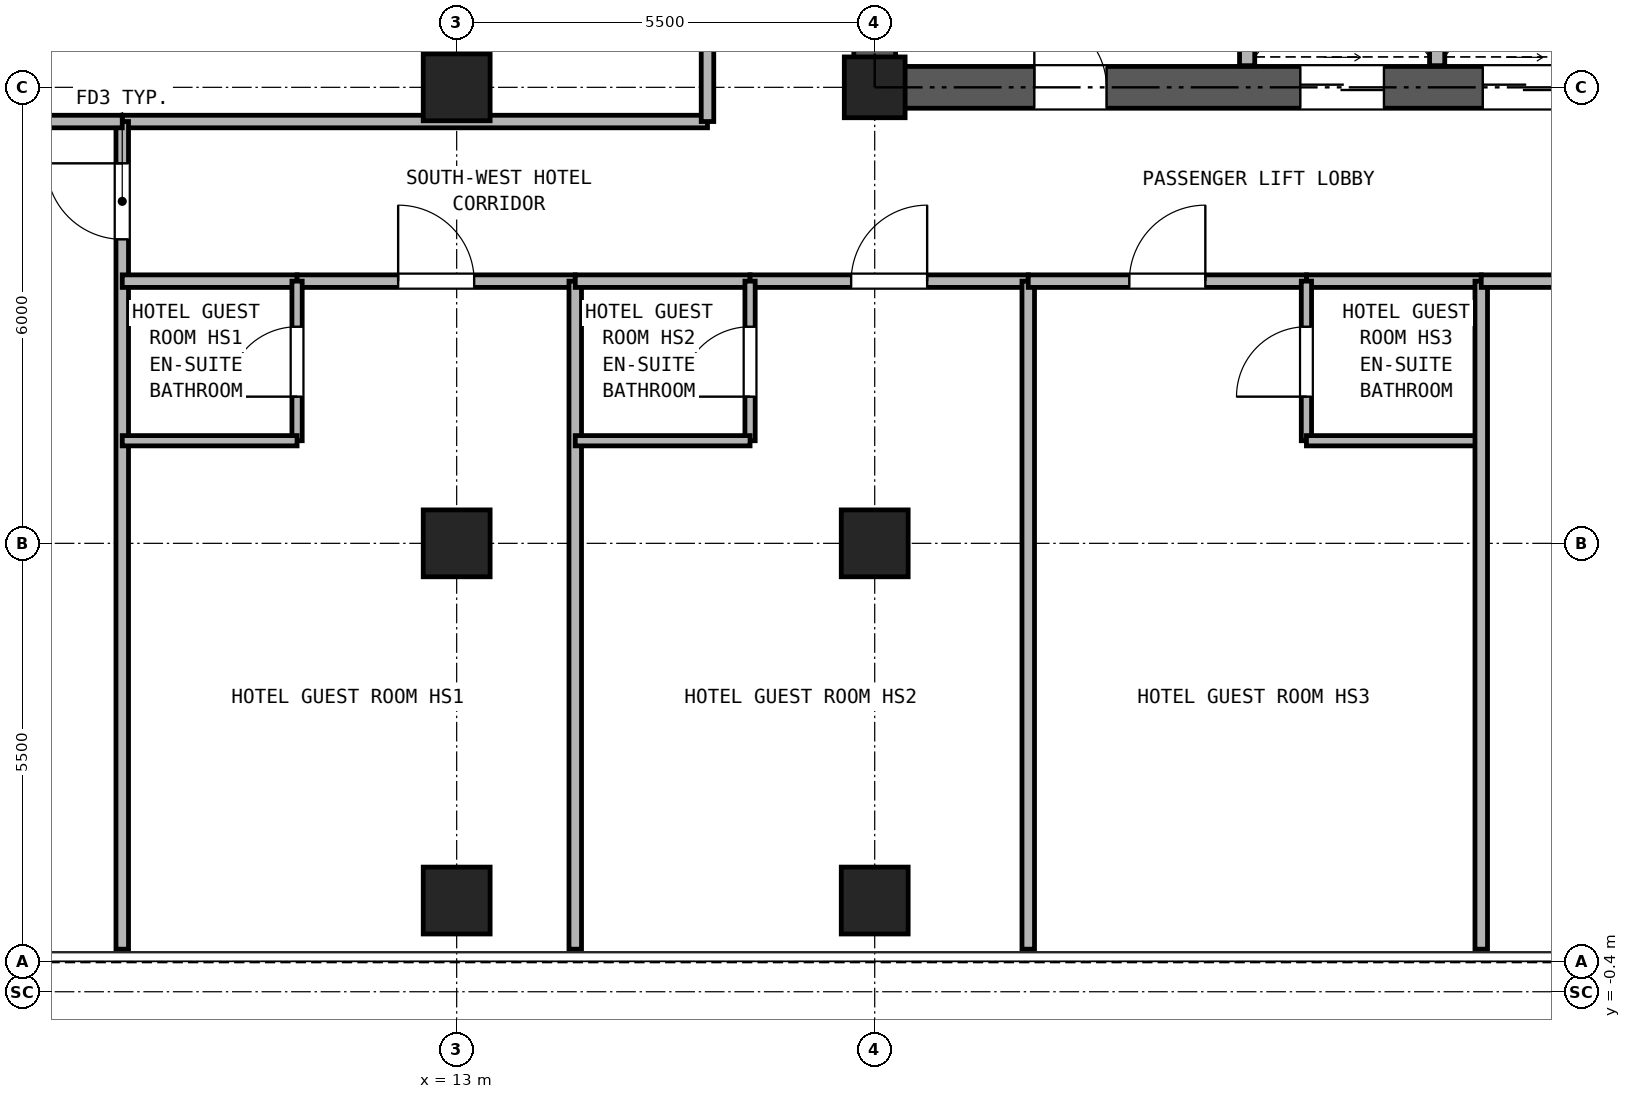
"""IFC4 building model, lengths in metres.
Left out: names, types, materials, properties, quantities, classifications, styles, units other than length and angle.
Written with IfcOpenShell. Run it as: python <this file> out.ifc"""

import sys

from ifc_helpers import new_model, si_unit, direction, frame, frame_2d, origin, origin_2d, place, context, subcontext, project, spatial, rectangle, hollow_rectangle, extrude, source, transform, mapped, element, fill, save


model = new_model("IFC4")
c1 = context("Model", 3, precision=1e-05, world=origin(), true_north=direction((0.0, 1.0)))
c2 = subcontext(c1, "Body", "Model", "MODEL_VIEW")
j1 = project(units=[si_unit("LENGTHUNIT", "METRE"), si_unit("PLANEANGLEUNIT", "RADIAN")], contexts=[c1])
p1 = place(None, origin())
s1 = spatial("IfcSite", under=j1, at=p1, CompositionType="ELEMENT")
p2 = place(p1, origin())
s2 = spatial("IfcBuilding", under=s1, at=p2, CompositionType="ELEMENT")
p3 = place(p2, frame((0.0, 0.0, 115.1)))
s3 = spatial("IfcBuildingStorey", under=s2, at=p3, CompositionType="ELEMENT", Elevation=115.1)
m1 = source(origin(), c2, "Body", "SweptSolid", [
    extrude(hollow_rectangle(XDim=0.88, YDim=0.88, WallThickness=0.05, at=origin_2d()), origin(), (0.0, 0.0, 1.0), 2.95),
])
for number, where, z_axis, x_axis in (
    (1, (13.0, 0.8, 0.0), (0.0, 0.0, 1.0), (1.0, 0.0, 0.0)),
    (2, (18.5, 0.8, 0.0), (0.0, 0.0, 1.0), (1.0, 0.0, 0.0)),
    (3, (13.0, 5.5, 0.0), (0.0, 0.0, 1.0), (1.0, 0.0, 0.0)),
    (4, (13.0, 11.5, 0.0), (0.0, 0.0, 1.0), (1.0, 0.0, 0.0)),
    (5, (18.5, 5.5, 0.0), (0.0, 0.0, 1.0), (1.0, 0.0, 0.0)),
):
    element("IfcColumn", number, at=place(p3, frame(where, z_axis=z_axis, x_axis=x_axis)), inside=s3, PredefinedType="COLUMN", context=c2, shape_type="MappedRepresentation", body=[
        mapped(m1, transform((0.0, 0.0, 0.0), x_axis=(1.0, 0.0, 0.0), y_axis=(0.0, 1.0, 0.0), z_axis=(0.0, 0.0, 1.0), scale=1.0)),
    ])
m2 = source(origin(), c2, "Body", "SweptSolid", [
    extrude(hollow_rectangle(XDim=0.8, YDim=0.8, WallThickness=0.045, at=origin_2d()), origin(), (0.0, 0.0, 1.0), 2.95),
])
p4 = place(p3, frame((18.5, 11.5, 0.0), z_axis=(0.0, 0.0, 1.0), x_axis=(1.0, 0.0, 0.0)))
e6 = element("IfcColumn", 6, at=p4, inside=s3, PredefinedType="COLUMN", context=c2, shape_type="MappedRepresentation", body=[
    mapped(m2, transform((0.0, 0.0, 0.0), x_axis=(1.0, 0.0, 0.0), y_axis=(0.0, 1.0, 0.0), z_axis=(0.0, 0.0, 1.0), scale=1.0)),
])
p5 = place(p3, frame((18.225, 11.5, 0.0), z_axis=(0.0, 0.0, 1.0), x_axis=(1.0, 0.0, 0.0)))
e7 = element("IfcWall", 7, at=p5, inside=s3, PredefinedType="SHEAR", context=c2, shape_type="SweptSolid", body=[
    extrude(rectangle(XDim=10.55, YDim=0.55, at=frame_2d((5.275, 0.0))), origin(), (0.0, 0.0, 1.0), 2.95),
])
p6 = place(p5, frame((2.375, 0.0, 0.0)))
e8 = element("IfcOpeningElement", 8, at=p6, cuts=e7, PredefinedType="OPENING", context=c2, shape_type="SweptSolid", body=[
    extrude(rectangle(XDim=0.95, YDim=2.15, at=frame_2d((0.475, 1.075))), frame((0.0, 0.285, 0.0), z_axis=(0.0, -1.0, 0.0), x_axis=(1.0, 0.0, 0.0)), (0.0, 0.0, 1.0), 0.57),
])
p7 = place(p5, frame((5.875, 0.0, 0.0)))
e9 = element("IfcOpeningElement", 9, at=p7, cuts=e7, PredefinedType="OPENING", context=c2, shape_type="SweptSolid", body=[
    extrude(rectangle(XDim=1.1, YDim=2.25, at=frame_2d((0.55, 1.125))), frame((0.0, 0.285, 0.0), z_axis=(0.0, -1.0, 0.0), x_axis=(1.0, 0.0, 0.0)), (0.0, 0.0, 1.0), 0.57),
])
p8 = place(p5, frame((8.275, 0.0, 0.0)))
e10 = element("IfcOpeningElement", 10, at=p8, cuts=e7, PredefinedType="OPENING", context=c2, shape_type="SweptSolid", body=[
    extrude(rectangle(XDim=1.1, YDim=2.25, at=frame_2d((0.55, 1.125))), frame((0.0, 0.285, 0.0), z_axis=(0.0, -1.0, 0.0), x_axis=(1.0, 0.0, 0.0)), (0.0, 0.0, 1.0), 0.57),
])
p9 = place(p3, frame((18.5, 11.775, 0.0), z_axis=(0.0, 0.0, 1.0), x_axis=(0.0, 1.0, 0.0)))
e11 = element("IfcWall", 11, at=p9, inside=s3, PredefinedType="SHEAR", context=c2, shape_type="SweptSolid", body=[
    extrude(rectangle(XDim=16.7, YDim=0.55, at=frame_2d((8.35, 0.0))), origin(), (0.0, 0.0, 1.0), 2.95),
])
p10 = place(p9, frame((7.375, 0.0, 0.0)))
e12 = element("IfcOpeningElement", 12, at=p10, cuts=e11, PredefinedType="OPENING", context=c2, shape_type="SweptSolid", body=[
    extrude(rectangle(XDim=1.15, YDim=2.2, at=frame_2d((0.575, 1.1))), frame((0.0, 0.285, 0.0), z_axis=(0.0, -1.0, 0.0), x_axis=(1.0, 0.0, 0.0)), (0.0, 0.0, 1.0), 0.57),
])
for number, where, z_axis, x_axis in (
    (13, (23.4, 11.785, 0.0), (0.0, 0.0, 1.0), (0.0, 1.0, 0.0)),
    (14, (25.9, 11.785, 0.0), (0.0, 0.0, 1.0), (0.0, 1.0, 0.0)),
):
    element("IfcWall", number, at=place(p3, frame(where, z_axis=z_axis, x_axis=x_axis)), inside=s3, PredefinedType="PARTITIONING", context=c2, shape_type="SweptSolid", body=[
        extrude(rectangle(XDim=3.215, YDim=0.2, at=frame_2d((1.607, 0.0))), origin(), (0.0, 0.0, 1.0), 2.95),
    ])
p11 = place(p3, frame((8.6, 11.05, 0.0), z_axis=(0.0, 0.0, 1.0), x_axis=(1.0, 0.0, 0.0)))
e15 = element("IfcWall", 15, at=p11, inside=s3, PredefinedType="PARTITIONING", context=c2, shape_type="SweptSolid", body=[
    extrude(rectangle(XDim=7.7, YDim=0.165, at=frame_2d((3.85, 0.0))), origin(), (0.0, 0.0, 1.0), 2.95),
])
p12 = place(p3, frame((16.3, 11.05, 0.0), z_axis=(0.0, 0.0, 1.0), x_axis=(0.0, 1.0, 0.0)))
e16 = element("IfcWall", 16, at=p12, inside=s3, PredefinedType="PARTITIONING", context=c2, shape_type="SweptSolid", body=[
    extrude(rectangle(XDim=18.15, YDim=0.165, at=frame_2d((9.075, 0.0))), origin(), (0.0, 0.0, 1.0), 2.95),
])
p13 = place(p12, frame((4.037, 0.0, 0.0)))
e17 = element("IfcOpeningElement", 17, at=p13, cuts=e16, PredefinedType="OPENING", context=c2, shape_type="SweptSolid", body=[
    extrude(rectangle(XDim=0.95, YDim=2.15, at=frame_2d((0.475, 1.075))), frame((0.0, 0.093, 0.0), z_axis=(0.0, -1.0, 0.0), x_axis=(1.0, 0.0, 0.0)), (0.0, 0.0, 1.0), 0.185),
])
p14 = place(p12, frame((13.113, 0.0, 0.0)))
e18 = element("IfcOpeningElement", 18, at=p14, cuts=e16, PredefinedType="OPENING", context=c2, shape_type="SweptSolid", body=[
    extrude(rectangle(XDim=0.95, YDim=2.15, at=frame_2d((0.475, 1.075))), frame((0.0, 0.093, 0.0), z_axis=(0.0, -1.0, 0.0), x_axis=(1.0, 0.0, 0.0)), (0.0, 0.0, 1.0), 0.185),
])
p15 = place(p3, frame((8.6, 0.16, 0.0), z_axis=(0.0, 0.0, 1.0), x_axis=(0.0, 1.0, 0.0)))
e19 = element("IfcWall", 19, at=p15, inside=s3, PredefinedType="PARTITIONING", context=c2, shape_type="SweptSolid", body=[
    extrude(rectangle(XDim=10.89, YDim=0.165, at=frame_2d((5.445, 0.0))), origin(), (0.0, 0.0, 1.0), 2.95),
])
p16 = place(p15, frame((9.34, 0.0, 0.0)))
e20 = element("IfcOpeningElement", 20, at=p16, cuts=e19, PredefinedType="OPENING", context=c2, shape_type="SweptSolid", body=[
    extrude(rectangle(XDim=1.0, YDim=2.15, at=frame_2d((0.5, 1.075))), frame((0.0, 0.093, 0.0), z_axis=(0.0, -1.0, 0.0), x_axis=(1.0, 0.0, 0.0)), (0.0, 0.0, 1.0), 0.185),
])
p17 = place(p3, frame((0.16, 11.05, 0.0), z_axis=(0.0, 0.0, 1.0), x_axis=(1.0, 0.0, 0.0)))
e21 = element("IfcWall", 21, at=p17, inside=s3, PredefinedType="PARTITIONING", context=c2, shape_type="SweptSolid", body=[
    extrude(rectangle(XDim=8.44, YDim=0.165, at=frame_2d((4.22, 0.0))), origin(), (0.0, 0.0, 1.0), 2.95),
])
p18 = place(p3, frame((8.6, 8.95, 0.0), z_axis=(0.0, 0.0, 1.0), x_axis=(1.0, 0.0, 0.0)))
e22 = element("IfcWall", 22, at=p18, inside=s3, PredefinedType="PARTITIONING", context=c2, shape_type="SweptSolid", body=[
    extrude(rectangle(XDim=2.3, YDim=0.165, at=frame_2d((1.15, 0.0))), origin(), (0.0, 0.0, 1.0), 2.95),
])
p19 = place(p3, frame((10.9, 8.95, 0.0), z_axis=(0.0, 0.0, 1.0), x_axis=(1.0, 0.0, 0.0)))
e23 = element("IfcWall", 23, at=p19, inside=s3, PredefinedType="PARTITIONING", context=c2, shape_type="SweptSolid", body=[
    extrude(rectangle(XDim=3.66, YDim=0.165, at=frame_2d((1.83, 0.0))), origin(), (0.0, 0.0, 1.0), 2.95),
])
p20 = place(p19, frame((1.33, 0.0, 0.0)))
e24 = element("IfcOpeningElement", 24, at=p20, cuts=e23, PredefinedType="OPENING", context=c2, shape_type="SweptSolid", body=[
    extrude(rectangle(XDim=1.0, YDim=2.15, at=frame_2d((0.5, 1.075))), frame((0.0, 0.093, 0.0), z_axis=(0.0, -1.0, 0.0), x_axis=(1.0, 0.0, 0.0)), (0.0, 0.0, 1.0), 0.185),
])
p21 = place(p3, frame((10.9, 6.85, 0.0), z_axis=(0.0, 0.0, 1.0), x_axis=(0.0, 1.0, 0.0)))
e25 = element("IfcWall", 25, at=p21, inside=s3, PredefinedType="PARTITIONING", context=c2, shape_type="SweptSolid", body=[
    extrude(rectangle(XDim=2.1, YDim=0.135, at=frame_2d((1.05, 0.0))), origin(), (0.0, 0.0, 1.0), 2.95),
])
p22 = place(p21, frame((0.58, 0.0, 0.0)))
e26 = element("IfcOpeningElement", 26, at=p22, cuts=e25, PredefinedType="OPENING", context=c2, shape_type="SweptSolid", body=[
    extrude(rectangle(XDim=0.92, YDim=2.1, at=frame_2d((0.46, 1.05))), frame((0.0, 0.077, 0.0), z_axis=(0.0, -1.0, 0.0), x_axis=(1.0, 0.0, 0.0)), (0.0, 0.0, 1.0), 0.155),
])
p23 = place(p3, frame((8.6, 6.85, 0.0), z_axis=(0.0, 0.0, 1.0), x_axis=(1.0, 0.0, 0.0)))
e27 = element("IfcWall", 27, at=p23, inside=s3, PredefinedType="PARTITIONING", context=c2, shape_type="SweptSolid", body=[
    extrude(rectangle(XDim=2.3, YDim=0.135, at=frame_2d((1.15, 0.0))), origin(), (0.0, 0.0, 1.0), 2.95),
])
p24 = place(p3, frame((14.56, 0.16, 0.0), z_axis=(0.0, 0.0, 1.0), x_axis=(0.0, 1.0, 0.0)))
e28 = element("IfcWall", 28, at=p24, inside=s3, PredefinedType="PARTITIONING", context=c2, shape_type="SweptSolid", body=[
    extrude(rectangle(XDim=8.79, YDim=0.165, at=frame_2d((4.395, 0.0))), origin(), (0.0, 0.0, 1.0), 2.95),
])
p25 = place(p3, frame((14.56, 8.95, 0.0), z_axis=(0.0, 0.0, 1.0), x_axis=(1.0, 0.0, 0.0)))
e29 = element("IfcWall", 29, at=p25, inside=s3, PredefinedType="PARTITIONING", context=c2, shape_type="SweptSolid", body=[
    extrude(rectangle(XDim=2.3, YDim=0.165, at=frame_2d((1.15, 0.0))), origin(), (0.0, 0.0, 1.0), 2.95),
])
p26 = place(p3, frame((16.86, 8.95, 0.0), z_axis=(0.0, 0.0, 1.0), x_axis=(1.0, 0.0, 0.0)))
e30 = element("IfcWall", 30, at=p26, inside=s3, PredefinedType="PARTITIONING", context=c2, shape_type="SweptSolid", body=[
    extrude(rectangle(XDim=3.66, YDim=0.165, at=frame_2d((1.83, 0.0))), origin(), (0.0, 0.0, 1.0), 2.95),
])
p27 = place(p26, frame((1.33, 0.0, 0.0)))
e31 = element("IfcOpeningElement", 31, at=p27, cuts=e30, PredefinedType="OPENING", context=c2, shape_type="SweptSolid", body=[
    extrude(rectangle(XDim=1.0, YDim=2.15, at=frame_2d((0.5, 1.075))), frame((0.0, 0.093, 0.0), z_axis=(0.0, -1.0, 0.0), x_axis=(1.0, 0.0, 0.0)), (0.0, 0.0, 1.0), 0.185),
])
p28 = place(p3, frame((16.86, 6.85, 0.0), z_axis=(0.0, 0.0, 1.0), x_axis=(0.0, 1.0, 0.0)))
e32 = element("IfcWall", 32, at=p28, inside=s3, PredefinedType="PARTITIONING", context=c2, shape_type="SweptSolid", body=[
    extrude(rectangle(XDim=2.1, YDim=0.135, at=frame_2d((1.05, 0.0))), origin(), (0.0, 0.0, 1.0), 2.95),
])
p29 = place(p28, frame((0.58, 0.0, 0.0)))
e33 = element("IfcOpeningElement", 33, at=p29, cuts=e32, PredefinedType="OPENING", context=c2, shape_type="SweptSolid", body=[
    extrude(rectangle(XDim=0.92, YDim=2.1, at=frame_2d((0.46, 1.05))), frame((0.0, 0.077, 0.0), z_axis=(0.0, -1.0, 0.0), x_axis=(1.0, 0.0, 0.0)), (0.0, 0.0, 1.0), 0.155),
])
p30 = place(p3, frame((14.56, 6.85, 0.0), z_axis=(0.0, 0.0, 1.0), x_axis=(1.0, 0.0, 0.0)))
e34 = element("IfcWall", 34, at=p30, inside=s3, PredefinedType="PARTITIONING", context=c2, shape_type="SweptSolid", body=[
    extrude(rectangle(XDim=2.3, YDim=0.135, at=frame_2d((1.15, 0.0))), origin(), (0.0, 0.0, 1.0), 2.95),
])
p31 = place(p3, frame((20.52, 0.16, 0.0), z_axis=(0.0, 0.0, 1.0), x_axis=(0.0, 1.0, 0.0)))
e35 = element("IfcWall", 35, at=p31, inside=s3, PredefinedType="PARTITIONING", context=c2, shape_type="SweptSolid", body=[
    extrude(rectangle(XDim=8.79, YDim=0.165, at=frame_2d((4.395, 0.0))), origin(), (0.0, 0.0, 1.0), 2.95),
])
p32 = place(p3, frame((24.18, 8.95, 0.0), z_axis=(0.0, 0.0, 1.0), x_axis=(1.0, 0.0, 0.0)))
e36 = element("IfcWall", 36, at=p32, inside=s3, PredefinedType="PARTITIONING", context=c2, shape_type="SweptSolid", body=[
    extrude(rectangle(XDim=2.3, YDim=0.165, at=frame_2d((1.15, 0.0))), origin(), (0.0, 0.0, 1.0), 2.95),
])
p33 = place(p3, frame((20.52, 8.95, 0.0), z_axis=(0.0, 0.0, 1.0), x_axis=(1.0, 0.0, 0.0)))
e37 = element("IfcWall", 37, at=p33, inside=s3, PredefinedType="PARTITIONING", context=c2, shape_type="SweptSolid", body=[
    extrude(rectangle(XDim=3.66, YDim=0.165, at=frame_2d((1.83, 0.0))), origin(), (0.0, 0.0, 1.0), 2.95),
])
p34 = place(p33, frame((1.33, 0.0, 0.0)))
e38 = element("IfcOpeningElement", 38, at=p34, cuts=e37, PredefinedType="OPENING", context=c2, shape_type="SweptSolid", body=[
    extrude(rectangle(XDim=1.0, YDim=2.15, at=frame_2d((0.5, 1.075))), frame((0.0, 0.093, 0.0), z_axis=(0.0, -1.0, 0.0), x_axis=(1.0, 0.0, 0.0)), (0.0, 0.0, 1.0), 0.185),
])
p35 = place(p3, frame((24.18, 6.85, 0.0), z_axis=(0.0, 0.0, 1.0), x_axis=(0.0, 1.0, 0.0)))
e39 = element("IfcWall", 39, at=p35, inside=s3, PredefinedType="PARTITIONING", context=c2, shape_type="SweptSolid", body=[
    extrude(rectangle(XDim=2.1, YDim=0.135, at=frame_2d((1.05, 0.0))), origin(), (0.0, 0.0, 1.0), 2.95),
])
p36 = place(p35, frame((0.58, 0.0, 0.0)))
e40 = element("IfcOpeningElement", 40, at=p36, cuts=e39, PredefinedType="OPENING", context=c2, shape_type="SweptSolid", body=[
    extrude(rectangle(XDim=0.92, YDim=2.1, at=frame_2d((0.46, 1.05))), frame((0.0, 0.077, 0.0), z_axis=(0.0, -1.0, 0.0), x_axis=(1.0, 0.0, 0.0)), (0.0, 0.0, 1.0), 0.155),
])
p37 = place(p3, frame((24.18, 6.85, 0.0), z_axis=(0.0, 0.0, 1.0), x_axis=(1.0, 0.0, 0.0)))
e41 = element("IfcWall", 41, at=p37, inside=s3, PredefinedType="PARTITIONING", context=c2, shape_type="SweptSolid", body=[
    extrude(rectangle(XDim=2.3, YDim=0.135, at=frame_2d((1.15, 0.0))), origin(), (0.0, 0.0, 1.0), 2.95),
])
p38 = place(p3, frame((26.48, 0.16, 0.0), z_axis=(0.0, 0.0, 1.0), x_axis=(0.0, 1.0, 0.0)))
e42 = element("IfcWall", 42, at=p38, inside=s3, PredefinedType="PARTITIONING", context=c2, shape_type="SweptSolid", body=[
    extrude(rectangle(XDim=8.79, YDim=0.165, at=frame_2d((4.395, 0.0))), origin(), (0.0, 0.0, 1.0), 2.95),
])
p39 = place(p3, frame((26.48, 8.95, 0.0), z_axis=(0.0, 0.0, 1.0), x_axis=(1.0, 0.0, 0.0)))
e43 = element("IfcWall", 43, at=p39, inside=s3, PredefinedType="PARTITIONING", context=c2, shape_type="SweptSolid", body=[
    extrude(rectangle(XDim=3.66, YDim=0.165, at=frame_2d((1.83, 0.0))), origin(), (0.0, 0.0, 1.0), 2.95),
])
p40 = place(p39, frame((1.33, 0.0, 0.0)))
e44 = element("IfcOpeningElement", 44, at=p40, cuts=e43, PredefinedType="OPENING", context=c2, shape_type="SweptSolid", body=[
    extrude(rectangle(XDim=1.0, YDim=2.15, at=frame_2d((0.5, 1.075))), frame((0.0, 0.093, 0.0), z_axis=(0.0, -1.0, 0.0), x_axis=(1.0, 0.0, 0.0)), (0.0, 0.0, 1.0), 0.185),
])
p41 = place(p6, frame((0.95, 0.0, 0.0), z_axis=(0.0, 0.0, 1.0), x_axis=(-1.0, 0.0, 0.0)))
e45 = element("IfcDoor", 45, at=p41, inside=s3, OperationType="SINGLE_SWING_LEFT", PredefinedType="DOOR", context=c2, shape_type="SweptSolid", body=[
    extrude(rectangle(XDim=0.95, YDim=2.15, at=frame_2d((0.475, 1.075))), frame((0.0, 0.025, 0.0), z_axis=(0.0, -1.0, 0.0), x_axis=(1.0, 0.0, 0.0)), (0.0, 0.0, 1.0), 0.05),
])
fill(e8, e45)
p42 = place(p7, frame((1.1, 0.0, 0.0), z_axis=(0.0, 0.0, 1.0), x_axis=(-1.0, 0.0, 0.0)))
e46 = element("IfcDoor", 46, at=p42, inside=s3, OperationType="DOUBLE_DOOR_SLIDING", PredefinedType="DOOR", context=c2, shape_type="SweptSolid", body=[
    extrude(rectangle(XDim=1.1, YDim=2.25, at=frame_2d((0.55, 1.125))), frame((0.0, 0.025, 0.0), z_axis=(0.0, -1.0, 0.0), x_axis=(1.0, 0.0, 0.0)), (0.0, 0.0, 1.0), 0.05),
])
fill(e9, e46)
p43 = place(p8, frame((1.1, 0.0, 0.0), z_axis=(0.0, 0.0, 1.0), x_axis=(-1.0, 0.0, 0.0)))
e47 = element("IfcDoor", 47, at=p43, inside=s3, OperationType="DOUBLE_DOOR_SLIDING", PredefinedType="DOOR", context=c2, shape_type="SweptSolid", body=[
    extrude(rectangle(XDim=1.1, YDim=2.25, at=frame_2d((0.55, 1.125))), frame((0.0, 0.025, 0.0), z_axis=(0.0, -1.0, 0.0), x_axis=(1.0, 0.0, 0.0)), (0.0, 0.0, 1.0), 0.05),
])
fill(e10, e47)
p44 = place(p16, origin())
e48 = element("IfcDoor", 48, at=p44, inside=s3, OperationType="SINGLE_SWING_RIGHT", PredefinedType="DOOR", context=c2, shape_type="SweptSolid", body=[
    extrude(rectangle(XDim=1.0, YDim=2.15, at=frame_2d((0.5, 1.075))), frame((0.0, 0.025, 0.0), z_axis=(0.0, -1.0, 0.0), x_axis=(1.0, 0.0, 0.0)), (0.0, 0.0, 1.0), 0.05),
])
fill(e20, e48)
p45 = place(p22, frame((0.92, 0.0, 0.0), z_axis=(0.0, 0.0, 1.0), x_axis=(-1.0, 0.0, 0.0)))
e49 = element("IfcDoor", 49, at=p45, inside=s3, OperationType="SINGLE_SWING_LEFT", PredefinedType="DOOR", context=c2, shape_type="SweptSolid", body=[
    extrude(rectangle(XDim=0.92, YDim=2.1, at=frame_2d((0.46, 1.05))), frame((0.0, 0.025, 0.0), z_axis=(0.0, -1.0, 0.0), x_axis=(1.0, 0.0, 0.0)), (0.0, 0.0, 1.0), 0.05),
])
fill(e26, e49)
p46 = place(p20, frame((1.0, 0.0, 0.0), z_axis=(0.0, 0.0, 1.0), x_axis=(-1.0, 0.0, 0.0)))
e50 = element("IfcDoor", 50, at=p46, inside=s3, OperationType="SINGLE_SWING_LEFT", PredefinedType="DOOR", context=c2, shape_type="SweptSolid", body=[
    extrude(rectangle(XDim=1.0, YDim=2.15, at=frame_2d((0.5, 1.075))), frame((0.0, 0.025, 0.0), z_axis=(0.0, -1.0, 0.0), x_axis=(1.0, 0.0, 0.0)), (0.0, 0.0, 1.0), 0.05),
])
fill(e24, e50)
p47 = place(p29, frame((0.92, 0.0, 0.0), z_axis=(0.0, 0.0, 1.0), x_axis=(-1.0, 0.0, 0.0)))
e51 = element("IfcDoor", 51, at=p47, inside=s3, OperationType="SINGLE_SWING_LEFT", PredefinedType="DOOR", context=c2, shape_type="SweptSolid", body=[
    extrude(rectangle(XDim=0.92, YDim=2.1, at=frame_2d((0.46, 1.05))), frame((0.0, 0.025, 0.0), z_axis=(0.0, -1.0, 0.0), x_axis=(1.0, 0.0, 0.0)), (0.0, 0.0, 1.0), 0.05),
])
fill(e33, e51)
p48 = place(p27, frame((1.0, 0.0, 0.0), z_axis=(0.0, 0.0, 1.0), x_axis=(-1.0, 0.0, 0.0)))
e52 = element("IfcDoor", 52, at=p48, inside=s3, OperationType="SINGLE_SWING_RIGHT", PredefinedType="DOOR", context=c2, shape_type="SweptSolid", body=[
    extrude(rectangle(XDim=1.0, YDim=2.15, at=frame_2d((0.5, 1.075))), frame((0.0, 0.025, 0.0), z_axis=(0.0, -1.0, 0.0), x_axis=(1.0, 0.0, 0.0)), (0.0, 0.0, 1.0), 0.05),
])
fill(e31, e52)
p49 = place(p36, origin())
e53 = element("IfcDoor", 53, at=p49, inside=s3, OperationType="SINGLE_SWING_LEFT", PredefinedType="DOOR", context=c2, shape_type="SweptSolid", body=[
    extrude(rectangle(XDim=0.92, YDim=2.1, at=frame_2d((0.46, 1.05))), frame((0.0, 0.025, 0.0), z_axis=(0.0, -1.0, 0.0), x_axis=(1.0, 0.0, 0.0)), (0.0, 0.0, 1.0), 0.05),
])
fill(e40, e53)
p50 = place(p34, frame((1.0, 0.0, 0.0), z_axis=(0.0, 0.0, 1.0), x_axis=(-1.0, 0.0, 0.0)))
e54 = element("IfcDoor", 54, at=p50, inside=s3, OperationType="SINGLE_SWING_RIGHT", PredefinedType="DOOR", context=c2, shape_type="SweptSolid", body=[
    extrude(rectangle(XDim=1.0, YDim=2.15, at=frame_2d((0.5, 1.075))), frame((0.0, 0.025, 0.0), z_axis=(0.0, -1.0, 0.0), x_axis=(1.0, 0.0, 0.0)), (0.0, 0.0, 1.0), 0.05),
])
fill(e38, e54)
save(model, sys.argv[1])
